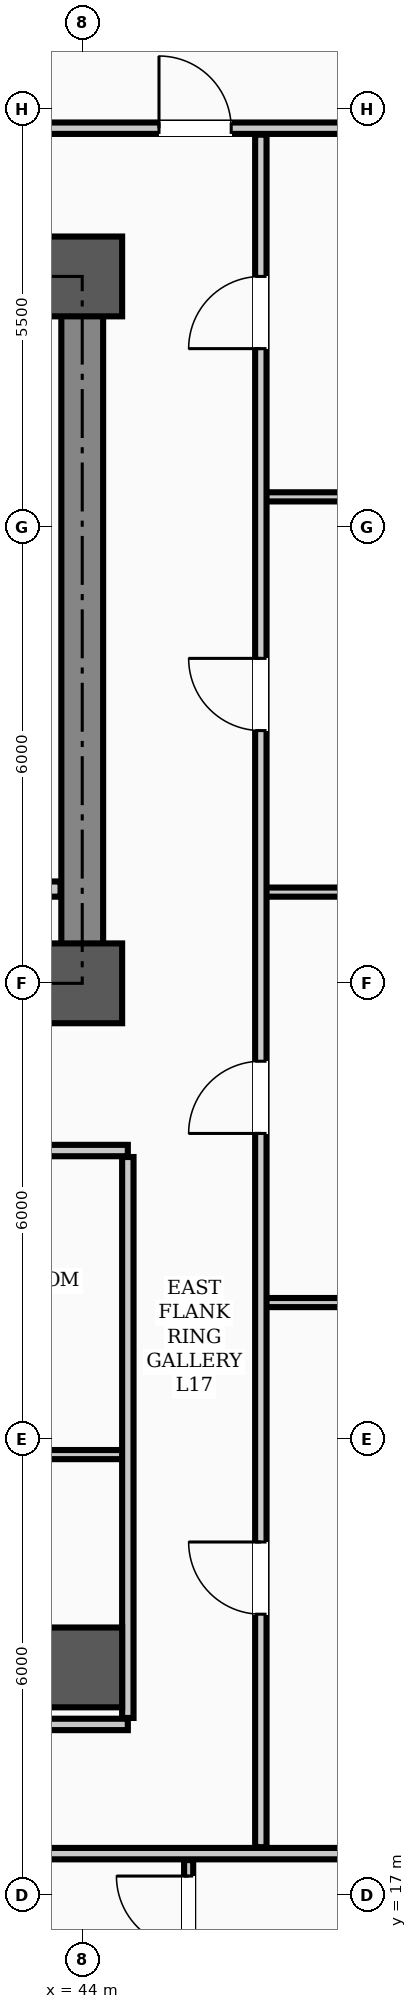
"""IFC4 building model, lengths in metres.
Left out: names, types, materials, properties, quantities, classifications, styles, units other than length and angle.
Written with IfcOpenShell. Run it as: python <this file> out.ifc"""

import sys

from ifc_helpers import new_model, si_unit, direction, frame, frame_2d, origin, origin_2d, place, context, subcontext, project, spatial, rectangle, hollow_rectangle, extrude, element, fill, save


model = new_model("IFC4")
c1 = context("Model", 3, precision=1e-05, world=origin(), true_north=direction((0.0, 1.0)))
c2 = subcontext(c1, "Body", "Model", "MODEL_VIEW")
j1 = project(units=[si_unit("LENGTHUNIT", "METRE"), si_unit("PLANEANGLEUNIT", "RADIAN")], contexts=[c1])
p1 = place(None, origin())
s1 = spatial("IfcSite", under=j1, at=p1, CompositionType="ELEMENT")
p2 = place(p1, origin())
s2 = spatial("IfcBuilding", under=s1, at=p2, CompositionType="ELEMENT")
p3 = place(p2, frame((0.0, 0.0, 69.4)))
s3 = spatial("IfcBuildingStorey", under=s2, at=p3, CompositionType="ELEMENT", Elevation=69.4)
for number, where, z_axis, x_axis in (
    (1, (44.0, 29.0, 0.0), (0.0, 0.0, 1.0), (1.0, 0.0, 0.0)),
    (2, (44.0, 38.3, 0.0), (0.0, 0.0, 1.0), (1.0, 0.0, 0.0)),
    (3, (44.0, 20.0, 0.0), (0.0, 0.0, 1.0), (1.0, 0.0, 0.0)),
):
    element("IfcColumn", number, at=place(p3, frame(where, z_axis=z_axis, x_axis=x_axis)), inside=s3, PredefinedType="COLUMN", context=c2, shape_type="SweptSolid", body=[
        extrude(hollow_rectangle(XDim=1.05, YDim=1.05, WallThickness=0.038, InnerFilletRadius=0.019, OuterFilletRadius=0.057, at=origin_2d()), origin(), (0.0, 0.0, 1.0), 3.9),
    ])
p4 = place(p3, frame((13.5, 29.0, 0.0), z_axis=(0.0, 0.0, 1.0), x_axis=(1.0, 0.0, 0.0)))
e4 = element("IfcWall", 4, at=p4, inside=s3, PredefinedType="SHEAR", context=c2, shape_type="SweptSolid", body=[
    extrude(rectangle(XDim=30.5, YDim=0.55, at=frame_2d((15.25, 0.0))), origin(), (0.0, 0.0, 1.0), 3.72),
])
p5 = place(p4, frame((1.75, 0.0, 0.0)))
e5 = element("IfcOpeningElement", 5, at=p5, cuts=e4, PredefinedType="OPENING", context=c2, shape_type="SweptSolid", body=[
    extrude(rectangle(XDim=1.1, YDim=2.08, at=frame_2d((0.55, 1.04))), frame((0.0, 0.285, 0.0), z_axis=(0.0, -1.0, 0.0), x_axis=(1.0, 0.0, 0.0)), (0.0, 0.0, 1.0), 0.57),
])
p6 = place(p4, frame((26.7, 0.0, 0.0)))
e6 = element("IfcOpeningElement", 6, at=p6, cuts=e4, PredefinedType="OPENING", context=c2, shape_type="SweptSolid", body=[
    extrude(rectangle(XDim=1.1, YDim=2.08, at=frame_2d((0.55, 1.04))), frame((0.0, 0.285, 0.0), z_axis=(0.0, -1.0, 0.0), x_axis=(1.0, 0.0, 0.0)), (0.0, 0.0, 1.0), 0.57),
])
p7 = place(p4, frame((6.8, 0.0, 0.0)))
e7 = element("IfcOpeningElement", 7, at=p7, cuts=e4, PredefinedType="OPENING", context=c2, shape_type="SweptSolid", body=[
    extrude(rectangle(XDim=1.1, YDim=2.08, at=frame_2d((0.55, 1.04))), frame((0.0, 0.285, 0.0), z_axis=(0.0, -1.0, 0.0), x_axis=(1.0, 0.0, 0.0)), (0.0, 0.0, 1.0), 0.57),
])
p8 = place(p4, frame((13.2, 0.0, 0.0)))
e8 = element("IfcOpeningElement", 8, at=p8, cuts=e4, PredefinedType="OPENING", context=c2, shape_type="SweptSolid", body=[
    extrude(rectangle(XDim=1.6, YDim=2.08, at=frame_2d((0.8, 1.04))), frame((0.0, 0.285, 0.0), z_axis=(0.0, -1.0, 0.0), x_axis=(1.0, 0.0, 0.0)), (0.0, 0.0, 1.0), 0.57),
])
p9 = place(p4, frame((19.5, 0.0, 0.0)))
e9 = element("IfcOpeningElement", 9, at=p9, cuts=e4, PredefinedType="OPENING", context=c2, shape_type="SweptSolid", body=[
    extrude(rectangle(XDim=0.9, YDim=2.08, at=frame_2d((0.45, 1.04))), frame((0.0, 0.285, 0.0), z_axis=(0.0, -1.0, 0.0), x_axis=(1.0, 0.0, 0.0)), (0.0, 0.0, 1.0), 0.57),
])
p10 = place(p4, frame((21.55, 0.0, 0.0)))
e10 = element("IfcOpeningElement", 10, at=p10, cuts=e4, PredefinedType="OPENING", context=c2, shape_type="SweptSolid", body=[
    extrude(rectangle(XDim=0.9, YDim=2.08, at=frame_2d((0.45, 1.04))), frame((0.0, 0.285, 0.0), z_axis=(0.0, -1.0, 0.0), x_axis=(1.0, 0.0, 0.0)), (0.0, 0.0, 1.0), 0.57),
])
p11 = place(p3, frame((13.5, 38.3, 0.0), z_axis=(0.0, 0.0, 1.0), x_axis=(1.0, 0.0, 0.0)))
e11 = element("IfcWall", 11, at=p11, inside=s3, PredefinedType="SHEAR", context=c2, shape_type="SweptSolid", body=[
    extrude(rectangle(XDim=30.5, YDim=0.55, at=frame_2d((15.25, 0.0))), origin(), (0.0, 0.0, 1.0), 3.72),
])
p12 = place(p3, frame((44.0, 29.35, 0.0), z_axis=(0.0, 0.0, 1.0), x_axis=(0.0, 1.0, 0.0)))
e12 = element("IfcWall", 12, at=p12, inside=s3, PredefinedType="SHEAR", context=c2, shape_type="SweptSolid", body=[
    extrude(rectangle(XDim=8.6, YDim=0.55, at=frame_2d((4.3, 0.0))), origin(), (0.0, 0.0, 1.0), 3.72),
])
p13 = place(p3, frame((42.4, 30.24, 0.0), z_axis=(0.0, 0.0, 1.0), x_axis=(1.0, 0.0, 0.0)))
e13 = element("IfcWall", 13, at=p13, inside=s3, PredefinedType="STANDARD", context=c2, shape_type="SweptSolid", body=[
    extrude(rectangle(XDim=1.315, YDim=0.2, at=frame_2d((0.658, 0.0))), origin(), (0.0, 0.0, 1.0), 3.1),
])
p14 = place(p3, frame((12.9, 26.8, 0.0), z_axis=(0.0, 0.0, 1.0), x_axis=(1.0, 0.0, 0.0)))
e14 = element("IfcWall", 14, at=p14, inside=s3, PredefinedType="PARTITIONING", context=c2, shape_type="SweptSolid", body=[
    extrude(rectangle(XDim=31.7, YDim=0.15, at=frame_2d((15.85, 0.0))), origin(), (0.0, 0.0, 1.0), 3.1),
])
p15 = place(p14, frame((13.6, 0.0, 0.0)))
e15 = element("IfcOpeningElement", 15, at=p15, cuts=e14, PredefinedType="OPENING", context=c2, shape_type="SweptSolid", body=[
    extrude(rectangle(XDim=1.6, YDim=2.08, at=frame_2d((0.8, 1.04))), frame((0.0, 0.085, 0.0), z_axis=(0.0, -1.0, 0.0), x_axis=(1.0, 0.0, 0.0)), (0.0, 0.0, 1.0), 0.17),
])
p16 = place(p14, frame((2.475, 0.0, 0.0)))
e16 = element("IfcOpeningElement", 16, at=p16, cuts=e14, PredefinedType="OPENING", context=c2, shape_type="SweptSolid", body=[
    extrude(rectangle(XDim=0.95, YDim=2.08, at=frame_2d((0.475, 1.04))), frame((0.0, 0.085, 0.0), z_axis=(0.0, -1.0, 0.0), x_axis=(1.0, 0.0, 0.0)), (0.0, 0.0, 1.0), 0.17),
])
p17 = place(p14, frame((9.125, 0.0, 0.0)))
e17 = element("IfcOpeningElement", 17, at=p17, cuts=e14, PredefinedType="OPENING", context=c2, shape_type="SweptSolid", body=[
    extrude(rectangle(XDim=0.95, YDim=2.08, at=frame_2d((0.475, 1.04))), frame((0.0, 0.085, 0.0), z_axis=(0.0, -1.0, 0.0), x_axis=(1.0, 0.0, 0.0)), (0.0, 0.0, 1.0), 0.17),
])
p18 = place(p14, frame((19.125, 0.0, 0.0)))
e18 = element("IfcOpeningElement", 18, at=p18, cuts=e14, PredefinedType="OPENING", context=c2, shape_type="SweptSolid", body=[
    extrude(rectangle(XDim=0.95, YDim=2.08, at=frame_2d((0.475, 1.04))), frame((0.0, 0.085, 0.0), z_axis=(0.0, -1.0, 0.0), x_axis=(1.0, 0.0, 0.0)), (0.0, 0.0, 1.0), 0.17),
])
p19 = place(p14, frame((26.325, 0.0, 0.0)))
e19 = element("IfcOpeningElement", 19, at=p19, cuts=e14, PredefinedType="OPENING", context=c2, shape_type="SweptSolid", body=[
    extrude(rectangle(XDim=0.95, YDim=2.08, at=frame_2d((0.475, 1.04))), frame((0.0, 0.085, 0.0), z_axis=(0.0, -1.0, 0.0), x_axis=(1.0, 0.0, 0.0)), (0.0, 0.0, 1.0), 0.17),
])
p20 = place(p3, frame((10.16, 17.55, 0.0), z_axis=(0.0, 0.0, 1.0), x_axis=(1.0, 0.0, 0.0)))
e20 = element("IfcWall", 20, at=p20, inside=s3, PredefinedType="PARTITIONING", context=c2, shape_type="SweptSolid", body=[
    extrude(rectangle(XDim=44.68, YDim=0.15, at=frame_2d((22.34, 0.0))), origin(), (0.0, 0.0, 1.0), 3.1),
])
p21 = place(p20, frame((2.04, 0.0, 0.0)))
e21 = element("IfcOpeningElement", 21, at=p21, cuts=e20, PredefinedType="OPENING", context=c2, shape_type="SweptSolid", body=[
    extrude(rectangle(XDim=0.95, YDim=2.08, at=frame_2d((0.475, 1.04))), frame((0.0, 0.085, 0.0), z_axis=(0.0, -1.0, 0.0), x_axis=(1.0, 0.0, 0.0)), (0.0, 0.0, 1.0), 0.17),
])
p22 = place(p20, frame((6.565, 0.0, 0.0)))
e22 = element("IfcOpeningElement", 22, at=p22, cuts=e20, PredefinedType="OPENING", context=c2, shape_type="SweptSolid", body=[
    extrude(rectangle(XDim=0.95, YDim=2.08, at=frame_2d((0.475, 1.04))), frame((0.0, 0.085, 0.0), z_axis=(0.0, -1.0, 0.0), x_axis=(1.0, 0.0, 0.0)), (0.0, 0.0, 1.0), 0.17),
])
p23 = place(p20, frame((11.865, 0.0, 0.0)))
e23 = element("IfcOpeningElement", 23, at=p23, cuts=e20, PredefinedType="OPENING", context=c2, shape_type="SweptSolid", body=[
    extrude(rectangle(XDim=0.95, YDim=2.08, at=frame_2d((0.475, 1.04))), frame((0.0, 0.085, 0.0), z_axis=(0.0, -1.0, 0.0), x_axis=(1.0, 0.0, 0.0)), (0.0, 0.0, 1.0), 0.17),
])
p24 = place(p20, frame((24.665, 0.0, 0.0)))
e24 = element("IfcOpeningElement", 24, at=p24, cuts=e20, PredefinedType="OPENING", context=c2, shape_type="SweptSolid", body=[
    extrude(rectangle(XDim=0.95, YDim=2.08, at=frame_2d((0.475, 1.04))), frame((0.0, 0.085, 0.0), z_axis=(0.0, -1.0, 0.0), x_axis=(1.0, 0.0, 0.0)), (0.0, 0.0, 1.0), 0.17),
])
p25 = place(p20, frame((31.765, 0.0, 0.0)))
e25 = element("IfcOpeningElement", 25, at=p25, cuts=e20, PredefinedType="OPENING", context=c2, shape_type="SweptSolid", body=[
    extrude(rectangle(XDim=0.95, YDim=2.08, at=frame_2d((0.475, 1.04))), frame((0.0, 0.085, 0.0), z_axis=(0.0, -1.0, 0.0), x_axis=(1.0, 0.0, 0.0)), (0.0, 0.0, 1.0), 0.17),
])
p26 = place(p3, frame((28.4, 19.25, 0.0), z_axis=(0.0, 0.0, 1.0), x_axis=(1.0, 0.0, 0.0)))
e26 = element("IfcWall", 26, at=p26, inside=s3, PredefinedType="PARTITIONING", context=c2, shape_type="SweptSolid", body=[
    extrude(rectangle(XDim=16.2, YDim=0.15, at=frame_2d((8.1, 0.0))), origin(), (0.0, 0.0, 1.0), 3.1),
])
p27 = place(p26, frame((3.625, 0.0, 0.0)))
e27 = element("IfcOpeningElement", 27, at=p27, cuts=e26, PredefinedType="OPENING", context=c2, shape_type="SweptSolid", body=[
    extrude(rectangle(XDim=0.95, YDim=2.08, at=frame_2d((0.475, 1.04))), frame((0.0, 0.085, 0.0), z_axis=(0.0, -1.0, 0.0), x_axis=(1.0, 0.0, 0.0)), (0.0, 0.0, 1.0), 0.17),
])
p28 = place(p26, frame((10.825, 0.0, 0.0)))
e28 = element("IfcOpeningElement", 28, at=p28, cuts=e26, PredefinedType="OPENING", context=c2, shape_type="SweptSolid", body=[
    extrude(rectangle(XDim=0.95, YDim=2.08, at=frame_2d((0.475, 1.04))), frame((0.0, 0.085, 0.0), z_axis=(0.0, -1.0, 0.0), x_axis=(1.0, 0.0, 0.0)), (0.0, 0.0, 1.0), 0.17),
])
p29 = place(p3, frame((34.8, 22.8, 0.0), z_axis=(0.0, 0.0, 1.0), x_axis=(1.0, 0.0, 0.0)))
e29 = element("IfcWall", 29, at=p29, inside=s3, PredefinedType="PARTITIONING", context=c2, shape_type="SweptSolid", body=[
    extrude(rectangle(XDim=9.8, YDim=0.12, at=frame_2d((4.9, 0.0))), origin(), (0.0, 0.0, 1.0), 3.1),
])
for number, where, z_axis, x_axis in (
    (30, (46.35, 24.8, 0.0), (0.0, 0.0, 1.0), (1.0, 0.0, 0.0)),
    (31, (46.35, 30.2, 0.0), (0.0, 0.0, 1.0), (1.0, 0.0, 0.0)),
    (32, (46.35, 35.4, 0.0), (0.0, 0.0, 1.0), (1.0, 0.0, 0.0)),
):
    element("IfcWall", number, at=place(p3, frame(where, z_axis=z_axis, x_axis=x_axis)), inside=s3, PredefinedType="PARTITIONING", context=c2, shape_type="SweptSolid", body=[
        extrude(rectangle(XDim=10.84, YDim=0.12, at=frame_2d((5.42, 0.0))), origin(), (0.0, 0.0, 1.0), 3.212),
    ])
p30 = place(p3, frame((7.81, 40.25, 0.0), z_axis=(0.0, 0.0, 1.0), x_axis=(1.0, 0.0, 0.0)))
e33 = element("IfcWall", 33, at=p30, inside=s3, PredefinedType="PARTITIONING", context=c2, shape_type="SweptSolid", body=[
    extrude(rectangle(XDim=49.38, YDim=0.15, at=frame_2d((24.69, 0.0))), origin(), (0.0, 0.0, 1.0), 3.1),
])
p31 = place(p30, frame((3.73, 0.0, 0.0)))
e34 = element("IfcOpeningElement", 34, at=p31, cuts=e33, PredefinedType="OPENING", context=c2, shape_type="SweptSolid", body=[
    extrude(rectangle(XDim=0.95, YDim=2.08, at=frame_2d((0.475, 1.04))), frame((0.0, 0.085, 0.0), z_axis=(0.0, -1.0, 0.0), x_axis=(1.0, 0.0, 0.0)), (0.0, 0.0, 1.0), 0.17),
])
p32 = place(p30, frame((11.015, 0.0, 0.0)))
e35 = element("IfcOpeningElement", 35, at=p32, cuts=e33, PredefinedType="OPENING", context=c2, shape_type="SweptSolid", body=[
    extrude(rectangle(XDim=0.95, YDim=2.08, at=frame_2d((0.475, 1.04))), frame((0.0, 0.085, 0.0), z_axis=(0.0, -1.0, 0.0), x_axis=(1.0, 0.0, 0.0)), (0.0, 0.0, 1.0), 0.17),
])
p33 = place(p30, frame((18.215, 0.0, 0.0)))
e36 = element("IfcOpeningElement", 36, at=p33, cuts=e33, PredefinedType="OPENING", context=c2, shape_type="SweptSolid", body=[
    extrude(rectangle(XDim=0.95, YDim=2.08, at=frame_2d((0.475, 1.04))), frame((0.0, 0.085, 0.0), z_axis=(0.0, -1.0, 0.0), x_axis=(1.0, 0.0, 0.0)), (0.0, 0.0, 1.0), 0.17),
])
p34 = place(p30, frame((25.515, 0.0, 0.0)))
e37 = element("IfcOpeningElement", 37, at=p34, cuts=e33, PredefinedType="OPENING", context=c2, shape_type="SweptSolid", body=[
    extrude(rectangle(XDim=0.95, YDim=2.08, at=frame_2d((0.475, 1.04))), frame((0.0, 0.085, 0.0), z_axis=(0.0, -1.0, 0.0), x_axis=(1.0, 0.0, 0.0)), (0.0, 0.0, 1.0), 0.17),
])
p35 = place(p30, frame((31.915, 0.0, 0.0)))
e38 = element("IfcOpeningElement", 38, at=p35, cuts=e33, PredefinedType="OPENING", context=c2, shape_type="SweptSolid", body=[
    extrude(rectangle(XDim=0.95, YDim=2.08, at=frame_2d((0.475, 1.04))), frame((0.0, 0.085, 0.0), z_axis=(0.0, -1.0, 0.0), x_axis=(1.0, 0.0, 0.0)), (0.0, 0.0, 1.0), 0.17),
])
p36 = place(p30, frame((37.2, 0.0, 0.0)))
e39 = element("IfcOpeningElement", 39, at=p36, cuts=e33, PredefinedType="OPENING", context=c2, shape_type="SweptSolid", body=[
    extrude(rectangle(XDim=0.95, YDim=2.08, at=frame_2d((0.475, 1.04))), frame((0.0, 0.085, 0.0), z_axis=(0.0, -1.0, 0.0), x_axis=(1.0, 0.0, 0.0)), (0.0, 0.0, 1.0), 0.17),
])
p37 = place(p3, frame((46.35, 17.635, 0.0), z_axis=(0.0, 0.0, 1.0), x_axis=(0.0, 1.0, 0.0)))
e40 = element("IfcWall", 40, at=p37, inside=s3, PredefinedType="PARTITIONING", context=c2, shape_type="SweptSolid", body=[
    extrude(rectangle(XDim=22.53, YDim=0.15, at=frame_2d((11.265, 0.0))), origin(), (0.0, 0.0, 1.0), 3.0),
])
p38 = place(p37, frame((3.065, 0.0, 0.0)))
e41 = element("IfcOpeningElement", 41, at=p38, cuts=e40, PredefinedType="OPENING", context=c2, shape_type="SweptSolid", body=[
    extrude(rectangle(XDim=0.95, YDim=2.08, at=frame_2d((0.475, 1.04))), frame((0.0, 0.085, 0.0), z_axis=(0.0, -1.0, 0.0), x_axis=(1.0, 0.0, 0.0)), (0.0, 0.0, 1.0), 0.17),
])
p39 = place(p37, frame((9.39, 0.0, 0.0)))
e42 = element("IfcOpeningElement", 42, at=p39, cuts=e40, PredefinedType="OPENING", context=c2, shape_type="SweptSolid", body=[
    extrude(rectangle(XDim=0.95, YDim=2.08, at=frame_2d((0.475, 1.04))), frame((0.0, 0.085, 0.0), z_axis=(0.0, -1.0, 0.0), x_axis=(1.0, 0.0, 0.0)), (0.0, 0.0, 1.0), 0.17),
])
p40 = place(p37, frame((14.69, 0.0, 0.0)))
e43 = element("IfcOpeningElement", 43, at=p40, cuts=e40, PredefinedType="OPENING", context=c2, shape_type="SweptSolid", body=[
    extrude(rectangle(XDim=0.95, YDim=2.08, at=frame_2d((0.475, 1.04))), frame((0.0, 0.085, 0.0), z_axis=(0.0, -1.0, 0.0), x_axis=(1.0, 0.0, 0.0)), (0.0, 0.0, 1.0), 0.17),
])
p41 = place(p37, frame((19.715, 0.0, 0.0)))
e44 = element("IfcOpeningElement", 44, at=p41, cuts=e40, PredefinedType="OPENING", context=c2, shape_type="SweptSolid", body=[
    extrude(rectangle(XDim=0.95, YDim=2.08, at=frame_2d((0.475, 1.04))), frame((0.0, 0.085, 0.0), z_axis=(0.0, -1.0, 0.0), x_axis=(1.0, 0.0, 0.0)), (0.0, 0.0, 1.0), 0.17),
])
p42 = place(p3, frame((44.6, 19.335, 0.0), z_axis=(0.0, 0.0, 1.0), x_axis=(0.0, 1.0, 0.0)))
e45 = element("IfcWall", 45, at=p42, inside=s3, PredefinedType="PARTITIONING", context=c2, shape_type="SweptSolid", body=[
    extrude(rectangle(XDim=7.38, YDim=0.15, at=frame_2d((3.69, 0.0))), origin(), (0.0, 0.0, 1.0), 3.0),
])
p43 = place(p3, frame((45.4, 15.31, 0.0), z_axis=(0.0, 0.0, 1.0), x_axis=(0.0, 1.0, 0.0)))
e46 = element("IfcWall", 46, at=p43, inside=s3, PredefinedType="PARTITIONING", context=c2, shape_type="SweptSolid", body=[
    extrude(rectangle(XDim=2.155, YDim=0.12, at=frame_2d((1.078, 0.0))), origin(), (0.0, 0.0, 1.0), 3.72),
])
p44 = place(p43, frame((0.995, 0.0, 0.0)))
e47 = element("IfcOpeningElement", 47, at=p44, cuts=e46, PredefinedType="OPENING", context=c2, shape_type="SweptSolid", body=[
    extrude(rectangle(XDim=0.95, YDim=2.08, at=frame_2d((0.475, 1.04))), frame((0.0, 0.07, 0.0), z_axis=(0.0, -1.0, 0.0), x_axis=(1.0, 0.0, 0.0)), (0.0, 0.0, 1.0), 0.14),
])
p45 = place(p44, origin())
e48 = element("IfcDoor", 48, at=p45, inside=s3, OperationType="SINGLE_SWING_RIGHT", PredefinedType="DOOR", context=c2, shape_type="SweptSolid", body=[
    extrude(rectangle(XDim=0.95, YDim=2.08, at=frame_2d((0.475, 1.04))), frame((0.0, 0.025, 0.0), z_axis=(0.0, -1.0, 0.0), x_axis=(1.0, 0.0, 0.0)), (0.0, 0.0, 1.0), 0.05),
])
fill(e47, e48)
p46 = place(p38, origin())
e49 = element("IfcDoor", 49, at=p46, inside=s3, OperationType="SINGLE_SWING_RIGHT", PredefinedType="DOOR", context=c2, shape_type="SweptSolid", body=[
    extrude(rectangle(XDim=0.95, YDim=2.08, at=frame_2d((0.475, 1.04))), frame((0.0, 0.025, 0.0), z_axis=(0.0, -1.0, 0.0), x_axis=(1.0, 0.0, 0.0)), (0.0, 0.0, 1.0), 0.05),
])
fill(e41, e49)
p47 = place(p39, origin())
e50 = element("IfcDoor", 50, at=p47, inside=s3, OperationType="SINGLE_SWING_LEFT", PredefinedType="DOOR", context=c2, shape_type="SweptSolid", body=[
    extrude(rectangle(XDim=0.95, YDim=2.08, at=frame_2d((0.475, 1.04))), frame((0.0, 0.025, 0.0), z_axis=(0.0, -1.0, 0.0), x_axis=(1.0, 0.0, 0.0)), (0.0, 0.0, 1.0), 0.05),
])
fill(e42, e50)
p48 = place(p40, origin())
e51 = element("IfcDoor", 51, at=p48, inside=s3, OperationType="SINGLE_SWING_RIGHT", PredefinedType="DOOR", context=c2, shape_type="SweptSolid", body=[
    extrude(rectangle(XDim=0.95, YDim=2.08, at=frame_2d((0.475, 1.04))), frame((0.0, 0.025, 0.0), z_axis=(0.0, -1.0, 0.0), x_axis=(1.0, 0.0, 0.0)), (0.0, 0.0, 1.0), 0.05),
])
fill(e43, e51)
p49 = place(p41, origin())
e52 = element("IfcDoor", 52, at=p49, inside=s3, OperationType="SINGLE_SWING_LEFT", PredefinedType="DOOR", context=c2, shape_type="SweptSolid", body=[
    extrude(rectangle(XDim=0.95, YDim=2.08, at=frame_2d((0.475, 1.04))), frame((0.0, 0.025, 0.0), z_axis=(0.0, -1.0, 0.0), x_axis=(1.0, 0.0, 0.0)), (0.0, 0.0, 1.0), 0.05),
])
fill(e44, e52)
p50 = place(p36, origin())
e53 = element("IfcDoor", 53, at=p50, inside=s3, OperationType="SINGLE_SWING_LEFT", PredefinedType="DOOR", context=c2, shape_type="SweptSolid", body=[
    extrude(rectangle(XDim=0.95, YDim=2.08, at=frame_2d((0.475, 1.04))), frame((0.0, 0.025, 0.0), z_axis=(0.0, -1.0, 0.0), x_axis=(1.0, 0.0, 0.0)), (0.0, 0.0, 1.0), 0.05),
])
fill(e39, e53)
save(model, sys.argv[1])
